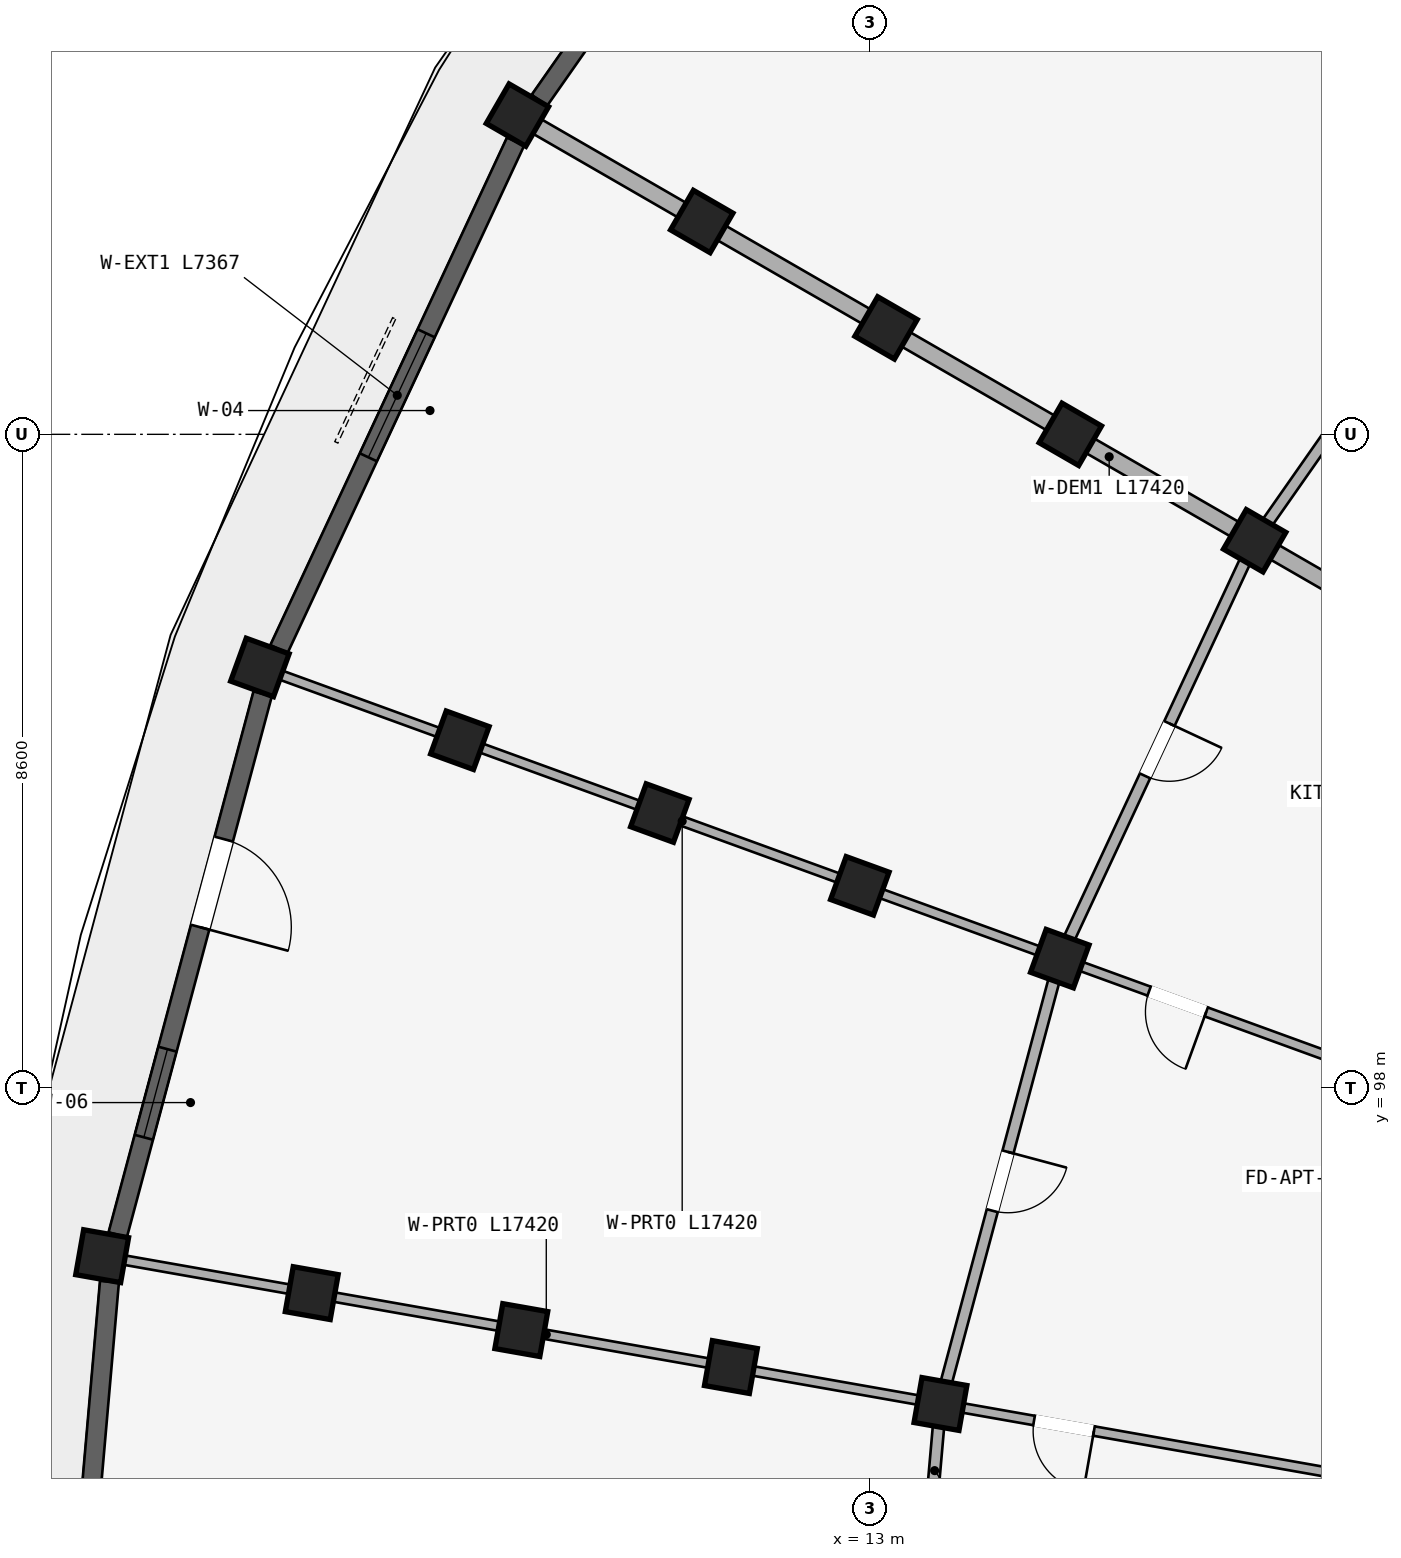
"""IFC4 building model, lengths in metres.
Left out: names, types, materials, properties, quantities, classifications, styles, units other than length and angle.
Written with IfcOpenShell. Run it as: python <this file> out.ifc"""

import sys

from ifc_helpers import new_model, si_unit, direction, frame, frame_2d, origin, origin_2d, place, context, subcontext, project, spatial, rectangle, extrude, element, fill, save


model = new_model("IFC4")
c1 = context("Model", 3, precision=1e-05, world=origin(), true_north=direction((0.0, 1.0)))
c2 = subcontext(c1, "Body", "Model", "MODEL_VIEW")
j1 = project(units=[si_unit("LENGTHUNIT", "METRE"), si_unit("PLANEANGLEUNIT", "RADIAN")], contexts=[c1])
p1 = place(None, origin())
s1 = spatial("IfcSite", under=j1, at=p1, CompositionType="ELEMENT")
p2 = place(p1, origin())
s2 = spatial("IfcBuilding", under=s1, at=p2, CompositionType="ELEMENT")
p3 = place(p2, frame((0.0, 0.0, 37.05)))
s3 = spatial("IfcBuildingStorey", under=s2, at=p3, CompositionType="ELEMENT", Elevation=37.05)
for number, where, z_axis, x_axis in (
    (1, (18.062, 105.2, 0.0), (0.0, 0.0, 1.0), (0.5, 0.866, 0.0)),
    (2, (15.637, 106.6, 0.0), (0.0, 0.0, 1.0), (0.5, 0.866, 0.0)),
    (3, (13.213, 108.0, 0.0), (0.0, 0.0, 1.0), (0.5, 0.866, 0.0)),
    (4, (10.788, 109.4, 0.0), (0.0, 0.0, 1.0), (0.5, 0.866, 0.0)),
):
    element("IfcColumn", number, at=place(p3, frame(where, z_axis=z_axis, x_axis=x_axis)), inside=s3, PredefinedType="COLUMN", context=c2, shape_type="SweptSolid", body=[
        extrude(rectangle(XDim=0.6, YDim=0.6, at=origin_2d()), origin(), (0.0, 0.0, 1.0), 2.93),
    ])
p4 = place(p3, frame((8.363, 110.8, 0.0), z_axis=(0.0, 0.0, 1.0), x_axis=(0.5, 0.866025403784, 0.0)))
e5 = element("IfcColumn", 5, at=p4, inside=s3, PredefinedType="COLUMN", context=c2, shape_type="SweptSolid", body=[
    extrude(rectangle(XDim=0.6, YDim=0.6, at=origin_2d()), origin(), (0.0, 0.0, 1.0), 2.97),
])
for number, where, z_axis, x_axis in (
    (6, (15.499, 99.702, 0.0), (0.0, 0.0, 1.0), (0.342, 0.94, 0.0)),
    (7, (12.868, 100.66, 0.0), (0.0, 0.0, 1.0), (0.342, 0.94, 0.0)),
    (8, (10.236, 101.618, 0.0), (0.0, 0.0, 1.0), (0.342, 0.94, 0.0)),
    (9, (7.605, 102.575, 0.0), (0.0, 0.0, 1.0), (0.342, 0.94, 0.0)),
):
    element("IfcColumn", number, at=place(p3, frame(where, z_axis=z_axis, x_axis=x_axis)), inside=s3, PredefinedType="COLUMN", context=c2, shape_type="SweptSolid", body=[
        extrude(rectangle(XDim=0.6, YDim=0.6, at=origin_2d()), origin(), (0.0, 0.0, 1.0), 2.93),
    ])
p5 = place(p3, frame((4.974, 103.533, 0.0), z_axis=(0.0, 0.0, 1.0), x_axis=(0.342020143326, 0.939692620786, 0.0)))
e10 = element("IfcColumn", 10, at=p5, inside=s3, PredefinedType="COLUMN", context=c2, shape_type="SweptSolid", body=[
    extrude(rectangle(XDim=0.6, YDim=0.6, at=origin_2d()), origin(), (0.0, 0.0, 1.0), 2.97),
])
for number, where, z_axis, x_axis in (
    (11, (13.929, 93.843, 0.0), (0.0, 0.0, 1.0), (0.174, 0.985, 0.0)),
    (12, (11.171, 94.329, 0.0), (0.0, 0.0, 1.0), (0.174, 0.985, 0.0)),
    (13, (8.414, 94.815, 0.0), (0.0, 0.0, 1.0), (0.174, 0.985, 0.0)),
    (14, (5.656, 95.302, 0.0), (0.0, 0.0, 1.0), (0.174, 0.985, 0.0)),
):
    element("IfcColumn", number, at=place(p3, frame(where, z_axis=z_axis, x_axis=x_axis)), inside=s3, PredefinedType="COLUMN", context=c2, shape_type="SweptSolid", body=[
        extrude(rectangle(XDim=0.6, YDim=0.6, at=origin_2d()), origin(), (0.0, 0.0, 1.0), 2.93),
    ])
p6 = place(p3, frame((2.899, 95.788, 0.0), z_axis=(0.0, 0.0, 1.0), x_axis=(0.173648177667, 0.984807753012, 0.0)))
e15 = element("IfcColumn", 15, at=p6, inside=s3, PredefinedType="COLUMN", context=c2, shape_type="SweptSolid", body=[
    extrude(rectangle(XDim=0.6, YDim=0.6, at=origin_2d()), origin(), (0.0, 0.0, 1.0), 2.97),
])
p7 = place(p3, frame((30.009, 109.479, 0.0), z_axis=(0.0, 0.0, 1.0), x_axis=(-0.642784757967, 0.766046835987, 0.0)))
e16 = element("IfcWall", 16, at=p7, inside=s3, PredefinedType="STANDARD", context=c2, shape_type="SweptSolid", body=[
    extrude(rectangle(XDim=17.42, YDim=0.22, at=frame_2d((8.71, 0.0))), origin(), (0.0, 0.0, 1.0), 2.372),
])
p8 = place(p3, frame((26.521, 105.991, 0.0), z_axis=(0.0, 0.0, 1.0), x_axis=(-0.766046835987, 0.642784757967, 0.0)))
e17 = element("IfcWall", 17, at=p8, inside=s3, PredefinedType="PARTITIONING", context=c2, shape_type="SweptSolid", body=[
    extrude(rectangle(XDim=17.42, YDim=0.125, at=frame_2d((8.71, 0.0))), origin(), (0.0, 0.0, 1.0), 2.372),
])
p9 = place(p8, frame((4.45, 0.0, 0.0)))
e18 = element("IfcOpeningElement", 18, at=p9, cuts=e17, PredefinedType="OPENING", context=c2, shape_type="SweptSolid", body=[
    extrude(rectangle(XDim=0.8, YDim=2.1, at=frame_2d((0.4, 1.05))), frame((0.0, 0.073, 0.0), z_axis=(0.0, -1.0, 0.0), x_axis=(1.0, 0.0, 0.0)), (0.0, 0.0, 1.0), 0.145),
])
p10 = place(p3, frame((23.691, 101.95, 0.0), z_axis=(0.0, 0.0, 1.0), x_axis=(-0.866026648973, 0.499997843263, 0.0)))
e19 = element("IfcWall", 19, at=p10, inside=s3, PredefinedType="STANDARD", context=c2, shape_type="SweptSolid", body=[
    extrude(rectangle(XDim=17.42, YDim=0.22, at=frame_2d((8.71, 0.0))), origin(), (0.0, 0.0, 1.0), 2.372),
])
p11 = place(p3, frame((21.607, 97.479, 0.0), z_axis=(0.0, 0.0, 1.0), x_axis=(-0.939691901159, 0.342022120477, 0.0)))
e20 = element("IfcWall", 20, at=p11, inside=s3, PredefinedType="PARTITIONING", context=c2, shape_type="SweptSolid", body=[
    extrude(rectangle(XDim=17.42, YDim=0.125, at=frame_2d((8.71, 0.0))), origin(), (0.0, 0.0, 1.0), 2.372),
])
p12 = place(p11, frame((4.45, 0.0, 0.0)))
e21 = element("IfcOpeningElement", 21, at=p12, cuts=e20, PredefinedType="OPENING", context=c2, shape_type="SweptSolid", body=[
    extrude(rectangle(XDim=0.8, YDim=2.1, at=frame_2d((0.4, 1.05))), frame((0.0, 0.073, 0.0), z_axis=(0.0, -1.0, 0.0), x_axis=(1.0, 0.0, 0.0)), (0.0, 0.0, 1.0), 0.145),
])
p13 = place(p3, frame((20.33, 92.714, 0.0), z_axis=(0.0, 0.0, 1.0), x_axis=(-0.984808098809, 0.173646216546, 0.0)))
e22 = element("IfcWall", 22, at=p13, inside=s3, PredefinedType="PARTITIONING", context=c2, shape_type="SweptSolid", body=[
    extrude(rectangle(XDim=17.42, YDim=0.125, at=frame_2d((8.71, 0.0))), origin(), (0.0, 0.0, 1.0), 2.372),
])
p14 = place(p13, frame((4.45, 0.0, 0.0)))
e23 = element("IfcOpeningElement", 23, at=p14, cuts=e22, PredefinedType="OPENING", context=c2, shape_type="SweptSolid", body=[
    extrude(rectangle(XDim=0.8, YDim=2.1, at=frame_2d((0.4, 1.05))), frame((0.0, 0.073, 0.0), z_axis=(0.0, -1.0, 0.0), x_axis=(1.0, 0.0, 0.0)), (0.0, 0.0, 1.0), 0.145),
])
p15 = place(p3, frame((21.542, 110.169, 0.0), z_axis=(0.0, 0.0, 1.0), x_axis=(-0.573594691504, -0.81913926159, 0.0)))
e24 = element("IfcWall", 24, at=p15, inside=s3, PredefinedType="PLUMBINGWALL", context=c2, shape_type="SweptSolid", body=[
    extrude(rectangle(XDim=6.066, YDim=0.15, at=frame_2d((3.033, 0.0))), origin(), (0.0, 0.0, 1.0), 2.372),
])
p16 = place(p15, frame((2.613, 0.0, 0.0)))
e25 = element("IfcOpeningElement", 25, at=p16, cuts=e24, PredefinedType="OPENING", context=c2, shape_type="SweptSolid", body=[
    extrude(rectangle(XDim=0.84, YDim=2.1, at=frame_2d((0.42, 1.05))), frame((0.0, 0.085, 0.0), z_axis=(0.0, -1.0, 0.0), x_axis=(1.0, 0.0, 0.0)), (0.0, 0.0, 1.0), 0.17),
])
p17 = place(p3, frame((18.062, 105.2, 0.0), z_axis=(0.0, 0.0, 1.0), x_axis=(-0.42260781991, -0.906312656069, 0.0)))
e26 = element("IfcWall", 26, at=p17, inside=s3, PredefinedType="PLUMBINGWALL", context=c2, shape_type="SweptSolid", body=[
    extrude(rectangle(XDim=6.066, YDim=0.15, at=frame_2d((3.033, 0.0))), origin(), (0.0, 0.0, 1.0), 2.372),
])
p18 = place(p17, frame((2.653, 0.0, 0.0)))
e27 = element("IfcOpeningElement", 27, at=p18, cuts=e26, PredefinedType="OPENING", context=c2, shape_type="SweptSolid", body=[
    extrude(rectangle(XDim=0.76, YDim=2.05, at=frame_2d((0.38, 1.025))), frame((0.0, 0.085, 0.0), z_axis=(0.0, -1.0, 0.0), x_axis=(1.0, 0.0, 0.0)), (0.0, 0.0, 1.0), 0.17),
])
p19 = place(p3, frame((15.499, 99.702, 0.0), z_axis=(0.0, 0.0, 1.0), x_axis=(-0.258827283048, -0.965923618901, 0.0)))
e28 = element("IfcWall", 28, at=p19, inside=s3, PredefinedType="PLUMBINGWALL", context=c2, shape_type="SweptSolid", body=[
    extrude(rectangle(XDim=6.066, YDim=0.15, at=frame_2d((3.033, 0.0))), origin(), (0.0, 0.0, 1.0), 2.372),
])
p20 = place(p19, frame((2.633, 0.0, 0.0)))
e29 = element("IfcOpeningElement", 29, at=p20, cuts=e28, PredefinedType="OPENING", context=c2, shape_type="SweptSolid", body=[
    extrude(rectangle(XDim=0.8, YDim=2.1, at=frame_2d((0.4, 1.05))), frame((0.0, 0.085, 0.0), z_axis=(0.0, -1.0, 0.0), x_axis=(1.0, 0.0, 0.0)), (0.0, 0.0, 1.0), 0.17),
])
p21 = place(p3, frame((13.929, 93.843, 0.0), z_axis=(0.0, 0.0, 1.0), x_axis=(-0.087174938512, -0.996193018494, 0.0)))
e30 = element("IfcWall", 30, at=p21, inside=s3, PredefinedType="PLUMBINGWALL", context=c2, shape_type="SweptSolid", body=[
    extrude(rectangle(XDim=6.066, YDim=0.15, at=frame_2d((3.033, 0.0))), origin(), (0.0, 0.0, 1.0), 2.372),
])
p22 = place(p21, frame((2.613, 0.0, 0.0)))
e31 = element("IfcOpeningElement", 31, at=p22, cuts=e30, PredefinedType="OPENING", context=c2, shape_type="SweptSolid", body=[
    extrude(rectangle(XDim=0.84, YDim=2.1, at=frame_2d((0.42, 1.05))), frame((0.0, 0.085, 0.0), z_axis=(0.0, -1.0, 0.0), x_axis=(1.0, 0.0, 0.0)), (0.0, 0.0, 1.0), 0.17),
])
p23 = place(p3, frame((12.878, 117.03, 0.0), z_axis=(0.0, 0.0, 1.0), x_axis=(-0.573582441919, -0.819147839112, 0.0)))
e32 = element("IfcWall", 32, at=p23, inside=s3, PredefinedType="STANDARD", context=c2, shape_type="SweptSolid", body=[
    extrude(rectangle(XDim=7.367, YDim=0.25, at=frame_2d((3.684, 0.0))), origin(), (0.0, 0.0, 1.0), 2.412),
])
p24 = place(p23, frame((2.708, 0.0, 0.362)))
e33 = element("IfcOpeningElement", 33, at=p24, cuts=e32, PredefinedType="OPENING", context=c2, shape_type="SweptSolid", body=[
    extrude(rectangle(XDim=1.95, YDim=1.85, at=frame_2d((0.975, 0.925))), frame((0.0, 0.135, 0.0), z_axis=(0.0, -1.0, 0.0), x_axis=(1.0, 0.0, 0.0)), (0.0, 0.0, 1.0), 0.27),
])
p25 = place(p3, frame((8.338, 110.452, 0.0), z_axis=(0.0, 0.0, 1.0), x_axis=(-0.422589730823, -0.906321090675, 0.0)))
e34 = element("IfcWall", 34, at=p25, inside=s3, PredefinedType="STANDARD", context=c2, shape_type="SweptSolid", body=[
    extrude(rectangle(XDim=7.367, YDim=0.25, at=frame_2d((3.684, 0.0))), origin(), (0.0, 0.0, 1.0), 2.412),
])
p26 = place(p25, frame((2.783, 0.0, 0.562)))
e35 = element("IfcOpeningElement", 35, at=p26, cuts=e34, PredefinedType="OPENING", context=c2, shape_type="SweptSolid", body=[
    extrude(rectangle(XDim=1.8, YDim=1.65, at=frame_2d((0.9, 0.825))), frame((0.0, 0.135, 0.0), z_axis=(0.0, -1.0, 0.0), x_axis=(1.0, 0.0, 0.0)), (0.0, 0.0, 1.0), 0.27),
])
p27 = place(p3, frame((5.01, 103.186, 0.0), z_axis=(0.0, 0.0, 1.0), x_axis=(-0.258821669831, -0.965925122991, 0.0)))
e36 = element("IfcWall", 36, at=p27, inside=s3, PredefinedType="STANDARD", context=c2, shape_type="SweptSolid", body=[
    extrude(rectangle(XDim=7.367, YDim=0.25, at=frame_2d((3.684, 0.0))), origin(), (0.0, 0.0, 1.0), 2.412),
])
p28 = place(p27, frame((4.84, 0.0, 0.462)))
e37 = element("IfcOpeningElement", 37, at=p28, cuts=e36, PredefinedType="OPENING", context=c2, shape_type="SweptSolid", body=[
    extrude(rectangle(XDim=1.2, YDim=1.5, at=frame_2d((0.6, 0.75))), frame((0.0, 0.135, 0.0), z_axis=(0.0, -1.0, 0.0), x_axis=(1.0, 0.0, 0.0)), (0.0, 0.0, 1.0), 0.27),
])
p29 = place(p27, frame((1.979, 0.0, 0.0)))
e38 = element("IfcOpeningElement", 38, at=p29, cuts=e36, PredefinedType="OPENING", context=c2, shape_type="SweptSolid", body=[
    extrude(rectangle(XDim=1.2, YDim=2.15, at=frame_2d((0.6, 1.075))), frame((0.0, 0.135, 0.0), z_axis=(0.0, -1.0, 0.0), x_axis=(1.0, 0.0, 0.0)), (0.0, 0.0, 1.0), 0.27),
])
p30 = place(p3, frame((2.995, 95.453, 0.0), z_axis=(0.0, 0.0, 1.0), x_axis=(-0.087122963287, -0.996197565379, 0.0)))
e39 = element("IfcWall", 39, at=p30, inside=s3, PredefinedType="STANDARD", context=c2, shape_type="SweptSolid", body=[
    extrude(rectangle(XDim=7.367, YDim=0.25, at=frame_2d((3.684, 0.0))), origin(), (0.0, 0.0, 1.0), 2.412),
])
p31 = place(p30, frame((2.783, 0.0, 0.562)))
e40 = element("IfcOpeningElement", 40, at=p31, cuts=e39, PredefinedType="OPENING", context=c2, shape_type="SweptSolid", body=[
    extrude(rectangle(XDim=1.8, YDim=1.65, at=frame_2d((0.9, 0.825))), frame((0.0, 0.135, 0.0), z_axis=(0.0, -1.0, 0.0), x_axis=(1.0, 0.0, 0.0)), (0.0, 0.0, 1.0), 0.27),
])
p32 = place(p26, origin())
e41 = element("IfcWindow", 41, at=p32, inside=s3, PartitioningType="DOUBLE_PANEL_VERTICAL", PredefinedType="WINDOW", context=c2, shape_type="SweptSolid", body=[
    extrude(rectangle(XDim=1.8, YDim=1.65, at=frame_2d((0.9, 0.825))), frame((0.0, 0.03, 0.0), z_axis=(0.0, -1.0, 0.0), x_axis=(1.0, 0.0, 0.0)), (0.0, 0.0, 1.0), 0.06),
])
fill(e35, e41)
p33 = place(p28, origin())
e42 = element("IfcWindow", 42, at=p33, inside=s3, PartitioningType="SINGLE_PANEL", PredefinedType="WINDOW", context=c2, shape_type="SweptSolid", body=[
    extrude(rectangle(XDim=1.2, YDim=1.5, at=frame_2d((0.6, 0.75))), frame((0.0, 0.03, 0.0), z_axis=(0.0, -1.0, 0.0), x_axis=(1.0, 0.0, 0.0)), (0.0, 0.0, 1.0), 0.06),
])
fill(e37, e42)
p34 = place(p12, frame((0.8, 0.0, 0.0), z_axis=(0.0, 0.0, 1.0), x_axis=(-1.0, 0.0, 0.0)))
e43 = element("IfcDoor", 43, at=p34, inside=s3, OperationType="SINGLE_SWING_RIGHT", PredefinedType="DOOR", context=c2, shape_type="SweptSolid", body=[
    extrude(rectangle(XDim=0.8, YDim=2.1, at=frame_2d((0.4, 1.05))), frame((0.0, 0.025, 0.0), z_axis=(0.0, -1.0, 0.0), x_axis=(1.0, 0.0, 0.0)), (0.0, 0.0, 1.0), 0.05),
])
fill(e21, e43)
p35 = place(p14, frame((0.8, 0.0, 0.0), z_axis=(0.0, 0.0, 1.0), x_axis=(-1.0, 0.0, 0.0)))
e44 = element("IfcDoor", 44, at=p35, inside=s3, OperationType="SINGLE_SWING_RIGHT", PredefinedType="DOOR", context=c2, shape_type="SweptSolid", body=[
    extrude(rectangle(XDim=0.8, YDim=2.1, at=frame_2d((0.4, 1.05))), frame((0.0, 0.025, 0.0), z_axis=(0.0, -1.0, 0.0), x_axis=(1.0, 0.0, 0.0)), (0.0, 0.0, 1.0), 0.05),
])
fill(e23, e44)
p36 = place(p18, origin())
e45 = element("IfcDoor", 45, at=p36, inside=s3, OperationType="SINGLE_SWING_LEFT", PredefinedType="DOOR", context=c2, shape_type="SweptSolid", body=[
    extrude(rectangle(XDim=0.76, YDim=2.05, at=frame_2d((0.38, 1.025))), frame((0.0, 0.025, 0.0), z_axis=(0.0, -1.0, 0.0), x_axis=(1.0, 0.0, 0.0)), (0.0, 0.0, 1.0), 0.05),
])
fill(e27, e45)
p37 = place(p20, frame((0.8, 0.0, 0.0), z_axis=(0.0, 0.0, 1.0), x_axis=(-1.0, 0.0, 0.0)))
e46 = element("IfcDoor", 46, at=p37, inside=s3, OperationType="SINGLE_SWING_RIGHT", PredefinedType="DOOR", context=c2, shape_type="SweptSolid", body=[
    extrude(rectangle(XDim=0.8, YDim=2.1, at=frame_2d((0.4, 1.05))), frame((0.0, 0.025, 0.0), z_axis=(0.0, -1.0, 0.0), x_axis=(1.0, 0.0, 0.0)), (0.0, 0.0, 1.0), 0.05),
])
fill(e29, e46)
p38 = place(p29, frame((1.2, 0.0, 0.0), z_axis=(0.0, 0.0, 1.0), x_axis=(-1.0, 0.0, 0.0)))
e47 = element("IfcDoor", 47, at=p38, inside=s3, OperationType="SINGLE_SWING_LEFT", PredefinedType="DOOR", context=c2, shape_type="SweptSolid", body=[
    extrude(rectangle(XDim=1.2, YDim=2.15, at=frame_2d((0.6, 1.075))), frame((0.0, 0.025, 0.0), z_axis=(0.0, -1.0, 0.0), x_axis=(1.0, 0.0, 0.0)), (0.0, 0.0, 1.0), 0.05),
])
fill(e38, e47)
save(model, sys.argv[1])
